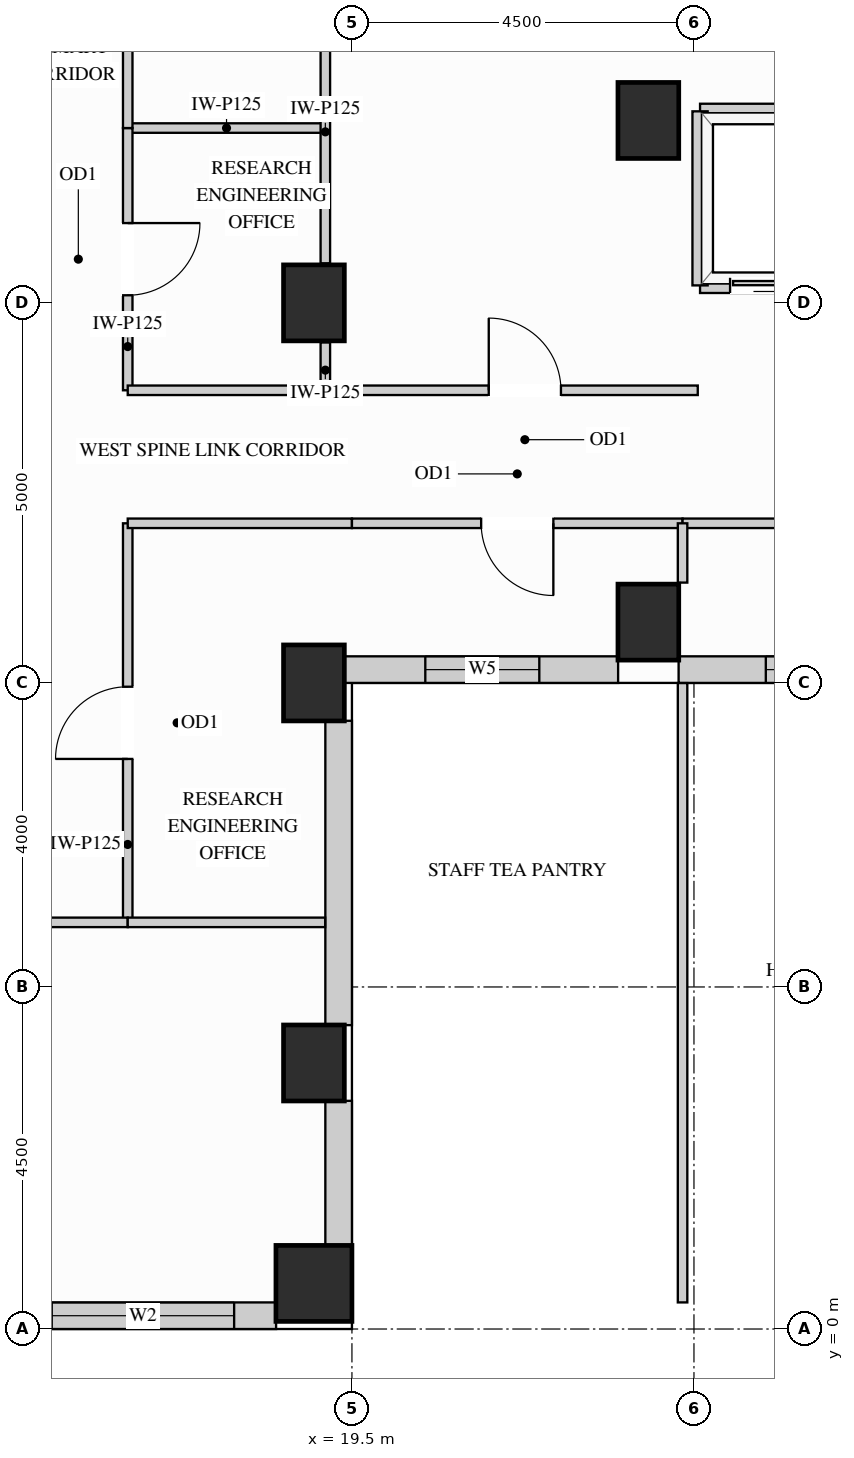
"""IFC4 building model, lengths in metres.
Left out: names, types, materials, properties, quantities, classifications, styles, units other than length and angle.
Written with IfcOpenShell. Run it as: python <this file> out.ifc"""

import sys

from ifc_helpers import new_model, si_unit, direction, frame, frame_2d, origin, origin_2d, place, context, subcontext, project, spatial, rectangle, extrude, source, transform, mapped, element, fill, save


model = new_model("IFC4")
c1 = context("Model", 3, precision=1e-05, world=origin(), true_north=direction((0.0, 1.0)))
c2 = subcontext(c1, "Body", "Model", "MODEL_VIEW")
j1 = project(units=[si_unit("LENGTHUNIT", "METRE"), si_unit("PLANEANGLEUNIT", "RADIAN")], contexts=[c1])
p1 = place(None, origin())
s1 = spatial("IfcSite", under=j1, at=p1, CompositionType="ELEMENT")
p2 = place(p1, origin())
s2 = spatial("IfcBuilding", under=s1, at=p2, CompositionType="ELEMENT")
p3 = place(p2, frame((0.0, 0.0, 161.1)))
s3 = spatial("IfcBuildingStorey", under=s2, at=p3, CompositionType="ELEMENT", Elevation=161.1)
m1 = source(origin(), c2, "Body", "SweptSolid", [
    extrude(rectangle(XDim=0.8, YDim=1.0, at=origin_2d()), origin(), (0.0, 0.0, 1.0), 3.4),
])
for number, where, z_axis, x_axis in (
    (1, (19.0, 13.5, 0.0), (0.0, 0.0, 1.0), (1.0, 0.0, 0.0)),
    (2, (19.0, 3.5, 0.0), (0.0, 0.0, 1.0), (1.0, 0.0, 0.0)),
    (3, (19.0, 8.5, 0.0), (0.0, 0.0, 1.0), (1.0, 0.0, 0.0)),
    (4, (23.4, 15.9, 0.0), (0.0, 0.0, 1.0), (1.0, 0.0, 0.0)),
    (5, (23.4, 9.3, 0.0), (0.0, 0.0, 1.0), (1.0, 0.0, 0.0)),
):
    element("IfcColumn", number, at=place(p3, frame(where, z_axis=z_axis, x_axis=x_axis)), inside=s3, PredefinedType="COLUMN", context=c2, shape_type="MappedRepresentation", body=[
        mapped(m1, transform((0.0, 0.0, 0.0), x_axis=(1.0, 0.0, 0.0), y_axis=(0.0, 1.0, 0.0), z_axis=(0.0, 0.0, 1.0))),
    ])
m2 = source(origin(), c2, "Body", "SweptSolid", [
    extrude(rectangle(XDim=1.0, YDim=1.0, at=origin_2d()), origin(), (0.0, 0.0, 1.0), 3.4),
])
p4 = place(p3, frame((19.0, 0.6, 0.0), z_axis=(0.0, 0.0, 1.0), x_axis=(1.0, 0.0, 0.0)))
e6 = element("IfcColumn", 6, at=p4, inside=s3, PredefinedType="COLUMN", context=c2, shape_type="MappedRepresentation", body=[
    mapped(m2, transform((0.0, 0.0, 0.0), x_axis=(1.0, 0.0, 0.0), y_axis=(0.0, 1.0, 0.0), z_axis=(0.0, 0.0, 1.0))),
])
p5 = place(p3, frame((14.998, 0.175, 0.0), z_axis=(0.0, 0.0, 1.0), x_axis=(1.0, 0.0, 0.0)))
e7 = element("IfcWall", 7, at=p5, inside=s3, PredefinedType="SOLIDWALL", context=c2, shape_type="SweptSolid", body=[
    extrude(rectangle(XDim=3.504, YDim=0.35, at=frame_2d((1.752, 0.0))), origin(), (0.0, 0.0, 1.0), 2.612),
])
p6 = place(p5, frame((0.552, 0.0, 0.78)))
e8 = element("IfcOpeningElement", 8, at=p6, cuts=e7, PredefinedType="OPENING", context=c2, shape_type="SweptSolid", body=[
    extrude(rectangle(XDim=2.4, YDim=1.652, at=frame_2d((1.2, 0.826))), frame((0.0, 0.185, 0.0), z_axis=(0.0, -1.0, 0.0), x_axis=(1.0, 0.0, 0.0)), (0.0, 0.0, 1.0), 0.37),
])
m3 = source(origin(), c2, "Body", "SweptSolid", [
    extrude(rectangle(XDim=1.904, YDim=0.35, at=frame_2d((0.952, 0.0))), origin(), (0.0, 0.0, 1.0), 2.612),
])
p7 = place(p3, frame((19.325, 1.098, 0.0), z_axis=(0.0, 0.0, 1.0), x_axis=(0.0, 1.0, 0.0)))
e9 = element("IfcWall", 9, at=p7, inside=s3, PredefinedType="SOLIDWALL", context=c2, shape_type="MappedRepresentation", body=[
    mapped(m3, transform((0.0, 0.0, 0.0), x_axis=(1.0, 0.0, 0.0), y_axis=(0.0, 1.0, 0.0), z_axis=(0.0, 0.0, 1.0))),
])
m4 = source(origin(), c2, "Body", "SweptSolid", [
    extrude(rectangle(XDim=4.004, YDim=0.35, at=frame_2d((2.002, 0.0))), origin(), (0.0, 0.0, 1.0), 2.612),
])
p8 = place(p3, frame((19.325, 3.998, 0.0), z_axis=(0.0, 0.0, 1.0), x_axis=(0.0, 1.0, 0.0)))
e10 = element("IfcWall", 10, at=p8, inside=s3, PredefinedType="SOLIDWALL", context=c2, shape_type="MappedRepresentation", body=[
    mapped(m4, transform((0.0, 0.0, 0.0), x_axis=(1.0, 0.0, 0.0), y_axis=(0.0, 1.0, 0.0), z_axis=(0.0, 0.0, 1.0))),
])
p9 = place(p3, frame((19.398, 8.675, 0.0), z_axis=(0.0, 0.0, 1.0), x_axis=(1.0, 0.0, 0.0)))
e11 = element("IfcWall", 11, at=p9, inside=s3, PredefinedType="SOLIDWALL", context=c2, shape_type="SweptSolid", body=[
    extrude(rectangle(XDim=3.604, YDim=0.35, at=frame_2d((1.802, 0.0))), origin(), (0.0, 0.0, 1.0), 3.385),
])
p10 = place(p9, frame((1.067, 0.0, 0.78)))
e12 = element("IfcOpeningElement", 12, at=p10, cuts=e11, PredefinedType="OPENING", context=c2, shape_type="SweptSolid", body=[
    extrude(rectangle(XDim=1.5, YDim=2.0, at=frame_2d((0.75, 1.0))), frame((0.0, 0.185, 0.0), z_axis=(0.0, -1.0, 0.0), x_axis=(1.0, 0.0, 0.0)), (0.0, 0.0, 1.0), 0.37),
])
p11 = place(p3, frame((23.798, 8.675, 0.0), z_axis=(0.0, 0.0, 1.0), x_axis=(1.0, 0.0, 0.0)))
e13 = element("IfcWall", 13, at=p11, inside=s3, PredefinedType="SOLIDWALL", context=c2, shape_type="SweptSolid", body=[
    extrude(rectangle(XDim=6.304, YDim=0.35, at=frame_2d((3.152, 0.0))), origin(), (0.0, 0.0, 1.0), 3.385),
])
p12 = place(p11, frame((1.147, 0.0, 0.78)))
e14 = element("IfcOpeningElement", 14, at=p12, cuts=e13, PredefinedType="OPENING", context=c2, shape_type="SweptSolid", body=[
    extrude(rectangle(XDim=1.5, YDim=2.0, at=frame_2d((0.75, 1.0))), frame((0.0, 0.185, 0.0), z_axis=(0.0, -1.0, 0.0), x_axis=(1.0, 0.0, 0.0)), (0.0, 0.0, 1.0), 0.37),
])
p13 = place(p11, frame((3.475, 0.0, 0.78)))
e15 = element("IfcOpeningElement", 15, at=p13, cuts=e13, PredefinedType="OPENING", context=c2, shape_type="SweptSolid", body=[
    extrude(rectangle(XDim=1.5, YDim=2.0, at=frame_2d((0.75, 1.0))), frame((0.0, 0.185, 0.0), z_axis=(0.0, -1.0, 0.0), x_axis=(1.0, 0.0, 0.0)), (0.0, 0.0, 1.0), 0.37),
])
m5 = source(origin(), c2, "Body", "SweptSolid", [
    extrude(rectangle(XDim=2.6, YDim=0.125, at=frame_2d((1.3, 0.0))), origin(), (0.0, 0.0, 1.0), 3.385),
])
p14 = place(p3, frame((16.55, 15.8, 0.0), z_axis=(0.0, 0.0, 1.0), x_axis=(1.0, 0.0, 0.0)))
e16 = element("IfcWall", 16, at=p14, inside=s3, PredefinedType="PARTITIONING", context=c2, shape_type="MappedRepresentation", body=[
    mapped(m5, transform((0.0, 0.0, 0.0), x_axis=(1.0, 0.0, 0.0), y_axis=(0.0, 1.0, 0.0), z_axis=(0.0, 0.0, 1.0))),
])
m6 = source(origin(), c2, "Body", "SweptSolid", [
    extrude(rectangle(XDim=0.63, YDim=0.125, at=frame_2d((0.315, 0.0))), origin(), (0.0, 0.0, 1.0), 2.773),
])
p15 = place(p3, frame((19.15, 12.35, 0.0), z_axis=(0.0, 0.0, 1.0), x_axis=(0.0, 1.0, 0.0)))
e17 = element("IfcWall", 17, at=p15, inside=s3, PredefinedType="PARTITIONING", context=c2, shape_type="MappedRepresentation", body=[
    mapped(m6, transform((0.0, 0.0, 0.0), x_axis=(1.0, 0.0, 0.0), y_axis=(0.0, 1.0, 0.0), z_axis=(0.0, 0.0, 1.0))),
])
m7 = source(origin(), c2, "Body", "SweptSolid", [
    extrude(rectangle(XDim=3.46, YDim=0.125, at=frame_2d((1.73, 0.0))), origin(), (0.0, 0.0, 1.0), 2.773),
])
p16 = place(p3, frame((19.15, 14.02, 0.0), z_axis=(0.0, 0.0, 1.0), x_axis=(0.0, 1.0, 0.0)))
e18 = element("IfcWall", 18, at=p16, inside=s3, PredefinedType="PARTITIONING", context=c2, shape_type="MappedRepresentation", body=[
    mapped(m7, transform((0.0, 0.0, 0.0), x_axis=(1.0, 0.0, 0.0), y_axis=(0.0, 1.0, 0.0), z_axis=(0.0, 0.0, 1.0))),
])
p17 = place(p3, frame((16.55, 12.35, 0.0), z_axis=(0.0, 0.0, 1.0), x_axis=(0.0, 1.0, 0.0)))
e19 = element("IfcWall", 19, at=p17, inside=s3, PredefinedType="PARTITIONING", context=c2, shape_type="SweptSolid", body=[
    extrude(rectangle(XDim=3.45, YDim=0.125, at=frame_2d((1.725, 0.0))), origin(), (0.0, 0.0, 1.0), 3.385),
])
p18 = place(p17, frame((1.25, 0.0, 0.0)))
e20 = element("IfcOpeningElement", 20, at=p18, cuts=e19, PredefinedType="OPENING", context=c2, shape_type="SweptSolid", body=[
    extrude(rectangle(XDim=0.95, YDim=2.15, at=frame_2d((0.475, 1.075))), frame((0.0, 0.073, 0.0), z_axis=(0.0, -1.0, 0.0), x_axis=(1.0, 0.0, 0.0)), (0.0, 0.0, 1.0), 0.145),
])
p19 = place(p3, frame((16.55, 15.8, 0.0), z_axis=(0.0, 0.0, 1.0), x_axis=(0.0, 1.0, 0.0)))
e21 = element("IfcWall", 21, at=p19, inside=s3, PredefinedType="PARTITIONING", context=c2, shape_type="SweptSolid", body=[
    extrude(rectangle(XDim=7.55, YDim=0.125, at=frame_2d((3.775, 0.0))), origin(), (0.0, 0.0, 1.0), 3.385),
])
p20 = place(p19, frame((3.3, 0.0, 0.0)))
e22 = element("IfcOpeningElement", 22, at=p20, cuts=e21, PredefinedType="OPENING", context=c2, shape_type="SweptSolid", body=[
    extrude(rectangle(XDim=0.95, YDim=2.15, at=frame_2d((0.475, 1.075))), frame((0.0, 0.073, 0.0), z_axis=(0.0, -1.0, 0.0), x_axis=(1.0, 0.0, 0.0)), (0.0, 0.0, 1.0), 0.145),
])
p21 = place(p3, frame((16.55, 5.35, 0.0), z_axis=(0.0, 0.0, 1.0), x_axis=(0.0, 1.0, 0.0)))
e23 = element("IfcWall", 23, at=p21, inside=s3, PredefinedType="PARTITIONING", context=c2, shape_type="SweptSolid", body=[
    extrude(rectangle(XDim=5.25, YDim=0.125, at=frame_2d((2.625, 0.0))), origin(), (0.0, 0.0, 1.0), 3.385),
])
p22 = place(p21, frame((2.15, 0.0, 0.0)))
e24 = element("IfcOpeningElement", 24, at=p22, cuts=e23, PredefinedType="OPENING", context=c2, shape_type="SweptSolid", body=[
    extrude(rectangle(XDim=0.95, YDim=2.15, at=frame_2d((0.475, 1.075))), frame((0.0, 0.073, 0.0), z_axis=(0.0, -1.0, 0.0), x_axis=(1.0, 0.0, 0.0)), (0.0, 0.0, 1.0), 0.145),
])
m8 = source(origin(), c2, "Body", "SweptSolid", [
    extrude(rectangle(XDim=2.95, YDim=0.125, at=frame_2d((1.475, 0.0))), origin(), (0.0, 0.0, 1.0), 3.385),
])
p23 = place(p3, frame((16.55, 12.35, 0.0), z_axis=(0.0, 0.0, 1.0), x_axis=(1.0, 0.0, 0.0)))
e25 = element("IfcWall", 25, at=p23, inside=s3, PredefinedType="PARTITIONING", context=c2, shape_type="MappedRepresentation", body=[
    mapped(m8, transform((0.0, 0.0, 0.0), x_axis=(1.0, 0.0, 0.0), y_axis=(0.0, 1.0, 0.0), z_axis=(0.0, 0.0, 1.0))),
])
p24 = place(p3, frame((19.5, 12.35, 0.0), z_axis=(0.0, 0.0, 1.0), x_axis=(1.0, 0.0, 0.0)))
e26 = element("IfcWall", 26, at=p24, inside=s3, PredefinedType="PARTITIONING", context=c2, shape_type="SweptSolid", body=[
    extrude(rectangle(XDim=4.55, YDim=0.125, at=frame_2d((2.275, 0.0))), origin(), (0.0, 0.0, 1.0), 3.385),
])
p25 = place(p24, frame((1.8, 0.0, 0.0)))
e27 = element("IfcOpeningElement", 27, at=p25, cuts=e26, PredefinedType="OPENING", context=c2, shape_type="SweptSolid", body=[
    extrude(rectangle(XDim=0.95, YDim=2.15, at=frame_2d((0.475, 1.075))), frame((0.0, 0.073, 0.0), z_axis=(0.0, -1.0, 0.0), x_axis=(1.0, 0.0, 0.0)), (0.0, 0.0, 1.0), 0.145),
])
p26 = place(p3, frame((16.55, 10.6, 0.0), z_axis=(0.0, 0.0, 1.0), x_axis=(1.0, 0.0, 0.0)))
e28 = element("IfcWall", 28, at=p26, inside=s3, PredefinedType="PARTITIONING", context=c2, shape_type="MappedRepresentation", body=[
    mapped(m8, transform((0.0, 0.0, 0.0), x_axis=(1.0, 0.0, 0.0), y_axis=(0.0, 1.0, 0.0), z_axis=(0.0, 0.0, 1.0))),
])
p27 = place(p3, frame((19.5, 10.6, 0.0), z_axis=(0.0, 0.0, 1.0), x_axis=(1.0, 0.0, 0.0)))
e29 = element("IfcWall", 29, at=p27, inside=s3, PredefinedType="PARTITIONING", context=c2, shape_type="SweptSolid", body=[
    extrude(rectangle(XDim=4.35, YDim=0.125, at=frame_2d((2.175, 0.0))), origin(), (0.0, 0.0, 1.0), 3.385),
])
p28 = place(p27, frame((1.7, 0.0, 0.0)))
e30 = element("IfcOpeningElement", 30, at=p28, cuts=e29, PredefinedType="OPENING", context=c2, shape_type="SweptSolid", body=[
    extrude(rectangle(XDim=0.95, YDim=2.15, at=frame_2d((0.475, 1.075))), frame((0.0, 0.073, 0.0), z_axis=(0.0, -1.0, 0.0), x_axis=(1.0, 0.0, 0.0)), (0.0, 0.0, 1.0), 0.145),
])
p29 = place(p3, frame((23.85, 10.6, 0.0), z_axis=(0.0, 0.0, 1.0), x_axis=(1.0, 0.0, 0.0)))
e31 = element("IfcWall", 31, at=p29, inside=s3, PredefinedType="PARTITIONING", context=c2, shape_type="SweptSolid", body=[
    extrude(rectangle(XDim=6.0, YDim=0.125, at=frame_2d((3.0, 0.0))), origin(), (0.0, 0.0, 1.0), 3.385),
])
p30 = place(p29, frame((2.525, 0.0, 0.0)))
e32 = element("IfcOpeningElement", 32, at=p30, cuts=e31, PredefinedType="OPENING", context=c2, shape_type="SweptSolid", body=[
    extrude(rectangle(XDim=0.95, YDim=2.15, at=frame_2d((0.475, 1.075))), frame((0.0, 0.073, 0.0), z_axis=(0.0, -1.0, 0.0), x_axis=(1.0, 0.0, 0.0)), (0.0, 0.0, 1.0), 0.145),
])
m9 = source(origin(), c2, "Body", "SweptSolid", [
    extrude(rectangle(XDim=8.148, YDim=0.125, at=frame_2d((4.074, 0.0))), origin(), (0.0, 0.0, 1.0), 3.385),
])
p31 = place(p3, frame((23.85, 0.35, 0.0), z_axis=(0.0, 0.0, 1.0), x_axis=(0.0, 1.0, 0.0)))
e33 = element("IfcWall", 33, at=p31, inside=s3, PredefinedType="PARTITIONING", context=c2, shape_type="MappedRepresentation", body=[
    mapped(m9, transform((0.0, 0.0, 0.0), x_axis=(1.0, 0.0, 0.0), y_axis=(0.0, 1.0, 0.0), z_axis=(0.0, 0.0, 1.0))),
])
m10 = source(origin(), c2, "Body", "SweptSolid", [
    extrude(rectangle(XDim=0.78, YDim=0.125, at=frame_2d((0.39, 0.0))), origin(), (0.0, 0.0, 1.0), 3.385),
])
p32 = place(p3, frame((23.85, 9.82, 0.0), z_axis=(0.0, 0.0, 1.0), x_axis=(0.0, 1.0, 0.0)))
e34 = element("IfcWall", 34, at=p32, inside=s3, PredefinedType="PARTITIONING", context=c2, shape_type="MappedRepresentation", body=[
    mapped(m10, transform((0.0, 0.0, 0.0), x_axis=(1.0, 0.0, 0.0), y_axis=(0.0, 1.0, 0.0), z_axis=(0.0, 0.0, 1.0))),
])
p33 = place(p3, frame((8.889, 5.35, 0.0), z_axis=(0.0, 0.0, 1.0), x_axis=(1.0, 0.0, 0.0)))
e35 = element("IfcWall", 35, at=p33, inside=s3, PredefinedType="PARTITIONING", context=c2, shape_type="SweptSolid", body=[
    extrude(rectangle(XDim=7.661, YDim=0.125, at=frame_2d((3.831, 0.0))), origin(), (0.0, 0.0, 1.0), 3.385),
])
p34 = place(p33, frame((3.355, 0.0, 0.0)))
e36 = element("IfcOpeningElement", 36, at=p34, cuts=e35, PredefinedType="OPENING", context=c2, shape_type="SweptSolid", body=[
    extrude(rectangle(XDim=0.95, YDim=2.15, at=frame_2d((0.475, 1.075))), frame((0.0, 0.073, 0.0), z_axis=(0.0, -1.0, 0.0), x_axis=(1.0, 0.0, 0.0)), (0.0, 0.0, 1.0), 0.145),
])
m11 = source(origin(), c2, "Body", "SweptSolid", [
    extrude(rectangle(XDim=2.598, YDim=0.125, at=frame_2d((1.299, 0.0))), origin(), (0.0, 0.0, 1.0), 3.385),
])
p35 = place(p3, frame((16.55, 5.35, 0.0), z_axis=(0.0, 0.0, 1.0), x_axis=(1.0, 0.0, 0.0)))
e37 = element("IfcWall", 37, at=p35, inside=s3, PredefinedType="PARTITIONING", context=c2, shape_type="MappedRepresentation", body=[
    mapped(m11, transform((0.0, 0.0, 0.0), x_axis=(1.0, 0.0, 0.0), y_axis=(0.0, 1.0, 0.0), z_axis=(0.0, 0.0, 1.0))),
])
m12 = source(origin(), c2, "Body", "SweptSolid", [
    extrude(rectangle(XDim=1.89, YDim=0.2, at=frame_2d((0.945, 0.0))), origin(), (0.0, 0.0, 1.0), 2.773),
])
p36 = place(p3, frame((24.08, 16.02, 0.0), z_axis=(0.0, 0.0, 1.0), x_axis=(1.0, 0.0, 0.0)))
e38 = element("IfcWall", 38, at=p36, inside=s3, PredefinedType="PARTITIONING", context=c2, shape_type="MappedRepresentation", body=[
    mapped(m12, transform((0.0, 0.0, 0.0), x_axis=(1.0, 0.0, 0.0), y_axis=(0.0, 1.0, 0.0), z_axis=(0.0, 0.0, 1.0))),
])
p37 = place(p3, frame((24.08, 13.73, 0.0), z_axis=(0.0, 0.0, 1.0), x_axis=(1.0, 0.0, 0.0)))
e39 = element("IfcWall", 39, at=p37, inside=s3, PredefinedType="PARTITIONING", context=c2, shape_type="SweptSolid", body=[
    extrude(rectangle(XDim=1.89, YDim=0.2, at=frame_2d((0.945, 0.0))), origin(), (0.0, 0.0, 1.0), 2.466),
])
p38 = place(p37, frame((0.395, 0.0, 0.0)))
e40 = element("IfcOpeningElement", 40, at=p38, cuts=e39, PredefinedType="OPENING", context=c2, shape_type="SweptSolid", body=[
    extrude(rectangle(XDim=1.1, YDim=2.2, at=frame_2d((0.55, 1.1))), frame((0.0, 0.11, 0.0), z_axis=(0.0, -1.0, 0.0), x_axis=(1.0, 0.0, 0.0)), (0.0, 0.0, 1.0), 0.22),
])
m13 = source(origin(), c2, "Body", "SweptSolid", [
    extrude(rectangle(XDim=2.29, YDim=0.2, at=frame_2d((1.145, 0.0))), origin(), (0.0, 0.0, 1.0), 3.385),
])
p39 = place(p3, frame((24.08, 13.73, 0.0), z_axis=(0.0, 0.0, 1.0), x_axis=(0.0, 1.0, 0.0)))
e41 = element("IfcWall", 41, at=p39, inside=s3, PredefinedType="PARTITIONING", context=c2, shape_type="MappedRepresentation", body=[
    mapped(m13, transform((0.0, 0.0, 0.0), x_axis=(1.0, 0.0, 0.0), y_axis=(0.0, 1.0, 0.0), z_axis=(0.0, 0.0, 1.0))),
])
m14 = source(origin(), c2, "Body", "SweptSolid", [
    extrude(rectangle(XDim=1.1, YDim=2.2, at=frame_2d((0.55, 1.1))), frame((0.0, 0.025, 0.0), z_axis=(0.0, -1.0, 0.0), x_axis=(1.0, 0.0, 0.0)), (0.0, 0.0, 1.0), 0.05),
])
p40 = place(p38, origin())
e42 = element("IfcDoor", 42, at=p40, inside=s3, OperationType="SLIDING_TO_LEFT", PredefinedType="DOOR", context=c2, shape_type="MappedRepresentation", body=[
    mapped(m14, transform((0.0, 0.0, 0.0), x_axis=(1.0, 0.0, 0.0), y_axis=(0.0, 1.0, 0.0), z_axis=(0.0, 0.0, 1.0))),
])
fill(e40, e42)
m15 = source(origin(), c2, "Body", "SweptSolid", [
    extrude(rectangle(XDim=0.95, YDim=2.15, at=frame_2d((0.475, 1.075))), frame((0.0, 0.025, 0.0), z_axis=(0.0, -1.0, 0.0), x_axis=(1.0, 0.0, 0.0)), (0.0, 0.0, 1.0), 0.05),
])
p41 = place(p22, origin())
e43 = element("IfcDoor", 43, at=p41, inside=s3, OperationType="SINGLE_SWING_LEFT", PredefinedType="DOOR", context=c2, shape_type="MappedRepresentation", body=[
    mapped(m15, transform((0.0, 0.0, 0.0), x_axis=(1.0, 0.0, 0.0), y_axis=(0.0, 1.0, 0.0), z_axis=(0.0, 0.0, 1.0))),
])
fill(e24, e43)
p42 = place(p18, origin())
e44 = element("IfcDoor", 44, at=p42, inside=s3, OperationType="SINGLE_SWING_RIGHT", PredefinedType="DOOR", context=c2, shape_type="MappedRepresentation", body=[
    mapped(m15, transform((0.0, 0.0, 0.0), x_axis=(1.0, 0.0, 0.0), y_axis=(0.0, 1.0, 0.0), z_axis=(0.0, 0.0, 1.0))),
])
fill(e20, e44)
p43 = place(p25, origin())
e45 = element("IfcDoor", 45, at=p43, inside=s3, OperationType="SINGLE_SWING_LEFT", PredefinedType="DOOR", context=c2, shape_type="MappedRepresentation", body=[
    mapped(m15, transform((0.0, 0.0, 0.0), x_axis=(1.0, 0.0, 0.0), y_axis=(0.0, 1.0, 0.0), z_axis=(0.0, 0.0, 1.0))),
])
fill(e27, e45)
p44 = place(p28, origin())
e46 = element("IfcDoor", 46, at=p44, inside=s3, OperationType="SINGLE_SWING_RIGHT", PredefinedType="DOOR", context=c2, shape_type="MappedRepresentation", body=[
    mapped(m15, transform((0.0, 0.0, 0.0), x_axis=(1.0, 0.0, 0.0), y_axis=(0.0, 1.0, 0.0), z_axis=(0.0, 0.0, 1.0))),
])
fill(e30, e46)
m16 = source(origin(), c2, "Body", "SweptSolid", [
    extrude(rectangle(XDim=2.4, YDim=1.652, at=frame_2d((1.2, 0.826))), frame((0.0, 0.03, 0.0), z_axis=(0.0, -1.0, 0.0), x_axis=(1.0, 0.0, 0.0)), (0.0, 0.0, 1.0), 0.06),
])
p45 = place(p6, origin())
e47 = element("IfcWindow", 47, at=p45, inside=s3, PartitioningType="SINGLE_PANEL", PredefinedType="WINDOW", context=c2, shape_type="MappedRepresentation", body=[
    mapped(m16, transform((0.0, 0.0, 0.0), x_axis=(1.0, 0.0, 0.0), y_axis=(0.0, 1.0, 0.0), z_axis=(0.0, 0.0, 1.0))),
])
fill(e8, e47)
m17 = source(origin(), c2, "Body", "SweptSolid", [
    extrude(rectangle(XDim=1.5, YDim=2.0, at=frame_2d((0.75, 1.0))), frame((0.0, 0.03, 0.0), z_axis=(0.0, -1.0, 0.0), x_axis=(1.0, 0.0, 0.0)), (0.0, 0.0, 1.0), 0.06),
])
p46 = place(p10, origin())
e48 = element("IfcWindow", 48, at=p46, inside=s3, PartitioningType="SINGLE_PANEL", PredefinedType="WINDOW", context=c2, shape_type="MappedRepresentation", body=[
    mapped(m17, transform((0.0, 0.0, 0.0), x_axis=(1.0, 0.0, 0.0), y_axis=(0.0, 1.0, 0.0), z_axis=(0.0, 0.0, 1.0))),
])
fill(e12, e48)
p47 = place(p12, origin())
e49 = element("IfcWindow", 49, at=p47, inside=s3, PartitioningType="SINGLE_PANEL", PredefinedType="WINDOW", context=c2, shape_type="MappedRepresentation", body=[
    mapped(m17, transform((0.0, 0.0, 0.0), x_axis=(1.0, 0.0, 0.0), y_axis=(0.0, 1.0, 0.0), z_axis=(0.0, 0.0, 1.0))),
])
fill(e14, e49)
save(model, sys.argv[1])
